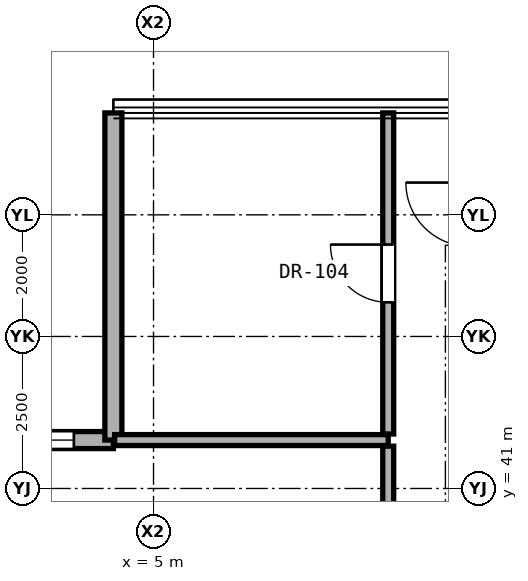
"""IFC4 building model, lengths in metres.
Left out: names, types, materials, properties, quantities, classifications, styles, units other than length and angle.
Written with IfcOpenShell. Run it as: python <this file> out.ifc"""

import sys

from ifc_helpers import new_model, si_unit, direction, frame, frame_2d, origin, place, context, subcontext, project, spatial, rectangle, extrude, element, fill, save


model = new_model("IFC4")
c1 = context("Model", 3, precision=1e-05, world=origin(), true_north=direction((0.0, 1.0)))
c2 = subcontext(c1, "Body", "Model", "MODEL_VIEW")
j1 = project(units=[si_unit("LENGTHUNIT", "METRE"), si_unit("PLANEANGLEUNIT", "RADIAN")], contexts=[c1])
p1 = place(None, origin())
s1 = spatial("IfcSite", under=j1, at=p1, CompositionType="ELEMENT")
p2 = place(p1, origin())
s2 = spatial("IfcBuilding", under=s1, at=p2, CompositionType="ELEMENT")
p3 = place(p2, frame((0.0, 0.0, 29.0)))
s3 = spatial("IfcBuildingStorey", under=s2, at=p3, CompositionType="ELEMENT", Elevation=29.0)
p4 = place(p3, frame((4.34, 41.796, 0.0), z_axis=(0.0, 0.0, 1.0), x_axis=(-1.0, 0.0, 0.0)))
e1 = element("IfcWall", 1, at=p4, inside=s3, PredefinedType="SOLIDWALL", context=c2, shape_type="SweptSolid", body=[
    extrude(rectangle(XDim=5.38, YDim=0.28, at=frame_2d((2.69, 0.0))), origin(), (0.0, 0.0, 1.0), 3.04),
])
p5 = place(p4, frame((0.65, 0.0, 0.85)))
e2 = element("IfcOpeningElement", 2, at=p5, cuts=e1, PredefinedType="OPENING", context=c2, shape_type="SweptSolid", body=[
    extrude(rectangle(XDim=1.1, YDim=2.0, at=frame_2d((0.55, 1.0))), frame((0.0, 0.15, 0.0), z_axis=(0.0, -1.0, 0.0), x_axis=(1.0, 0.0, 0.0)), (0.0, 0.0, 1.0), 0.3),
])
p6 = place(p3, frame((4.34, 47.176, 0.0), z_axis=(0.0, 0.0, 1.0), x_axis=(0.0, -1.0, 0.0)))
e3 = element("IfcWall", 3, at=p6, inside=s3, PredefinedType="SOLIDWALL", context=c2, shape_type="SweptSolid", body=[
    extrude(rectangle(XDim=5.38, YDim=0.28, at=frame_2d((2.69, 0.0))), origin(), (0.0, 0.0, 1.0), 3.04),
])
p7 = place(p3, frame((4.36, 41.796, 0.0), z_axis=(0.0, 0.0, 1.0), x_axis=(1.0, 0.0, 0.0)))
e4 = element("IfcWall", 4, at=p7, inside=s3, PredefinedType="PARTITIONING", context=c2, shape_type="SweptSolid", body=[
    extrude(rectangle(XDim=4.5, YDim=0.18, at=frame_2d((2.25, 0.0))), origin(), (0.0, 0.0, 1.0), 3.06),
])
p8 = place(p3, frame((8.86, 32.942, 0.0), z_axis=(0.0, 0.0, 1.0), x_axis=(0.0, 1.0, 0.0)))
e5 = element("IfcWall", 5, at=p8, inside=s3, PredefinedType="PARTITIONING", context=c2, shape_type="SweptSolid", body=[
    extrude(rectangle(XDim=8.754, YDim=0.18, at=frame_2d((4.377, 0.0))), origin(), (0.0, 0.0, 1.0), 2.436),
])
p9 = place(p8, frame((3.852, 0.0, 0.0)))
e6 = element("IfcOpeningElement", 6, at=p9, cuts=e5, PredefinedType="OPENING", context=c2, shape_type="SweptSolid", body=[
    extrude(rectangle(XDim=1.05, YDim=2.2, at=frame_2d((0.525, 1.1))), frame((0.0, 0.1, 0.0), z_axis=(0.0, -1.0, 0.0), x_axis=(1.0, 0.0, 0.0)), (0.0, 0.0, 1.0), 0.2),
])
p10 = place(p3, frame((8.86, 41.896, 0.0), z_axis=(0.0, 0.0, 1.0), x_axis=(0.0, 1.0, 0.0)))
e7 = element("IfcWall", 7, at=p10, inside=s3, PredefinedType="PARTITIONING", context=c2, shape_type="SweptSolid", body=[
    extrude(rectangle(XDim=5.28, YDim=0.18, at=frame_2d((2.64, 0.0))), origin(), (0.0, 0.0, 1.0), 3.06),
])
p11 = place(p10, frame((2.165, 0.0, 0.0)))
e8 = element("IfcOpeningElement", 8, at=p11, cuts=e7, PredefinedType="OPENING", context=c2, shape_type="SweptSolid", body=[
    extrude(rectangle(XDim=0.95, YDim=2.15, at=frame_2d((0.475, 1.075))), frame((0.0, 0.1, 0.0), z_axis=(0.0, -1.0, 0.0), x_axis=(1.0, 0.0, 0.0)), (0.0, 0.0, 1.0), 0.2),
])
p12 = place(p5, origin())
e9 = element("IfcWindow", 9, at=p12, inside=s3, PartitioningType="SINGLE_PANEL", PredefinedType="WINDOW", context=c2, shape_type="SweptSolid", body=[
    extrude(rectangle(XDim=1.1, YDim=2.0, at=frame_2d((0.55, 1.0))), frame((0.0, 0.03, 0.0), z_axis=(0.0, -1.0, 0.0), x_axis=(1.0, 0.0, 0.0)), (0.0, 0.0, 1.0), 0.06),
])
fill(e2, e9)
p13 = place(p11, origin())
e10 = element("IfcDoor", 10, at=p13, inside=s3, OperationType="SINGLE_SWING_RIGHT", PredefinedType="DOOR", context=c2, shape_type="SweptSolid", body=[
    extrude(rectangle(XDim=0.95, YDim=2.15, at=frame_2d((0.475, 1.075))), frame((0.0, 0.025, 0.0), z_axis=(0.0, -1.0, 0.0), x_axis=(1.0, 0.0, 0.0)), (0.0, 0.0, 1.0), 0.05),
])
fill(e8, e10)
save(model, sys.argv[1])
